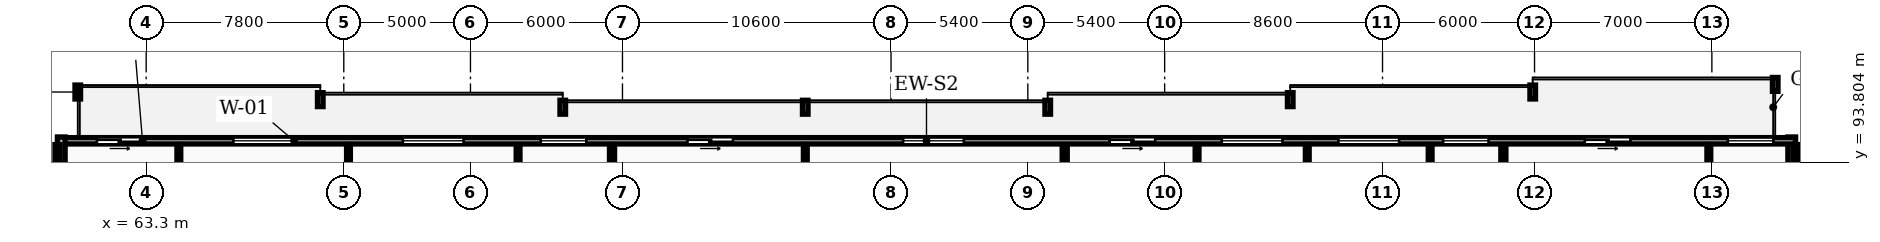
"""IFC4 building model, lengths in metres.
Left out: names, types, materials, properties, quantities, classifications, styles, units other than length and angle.
Written with IfcOpenShell. Run it as: python <this file> out.ifc"""

import sys

from ifc_helpers import new_model, si_unit, direction, frame, frame_2d, origin, place, context, subcontext, project, spatial, rectangle, extrude, element, fill, save


model = new_model("IFC4")
c1 = context("Model", 3, precision=1e-05, world=origin(), true_north=direction((0.0, 1.0)))
c2 = subcontext(c1, "Body", "Model", "MODEL_VIEW")
j1 = project(units=[si_unit("LENGTHUNIT", "METRE"), si_unit("PLANEANGLEUNIT", "RADIAN")], contexts=[c1])
p1 = place(None, origin())
s1 = spatial("IfcSite", under=j1, at=p1, CompositionType="ELEMENT")
p2 = place(p1, origin())
s2 = spatial("IfcBuilding", under=s1, at=p2, CompositionType="ELEMENT")
p3 = place(p2, frame((0.0, 0.0, 228.65)))
s3 = spatial("IfcBuildingStorey", under=s2, at=p3, CompositionType="ELEMENT", Elevation=228.65)
p4 = place(p3, frame((128.25, 91.2, 0.0), z_axis=(0.0, 0.0, 1.0), x_axis=(0.0, 1.0, 0.0)))
e1 = element("IfcWall", 1, at=p4, inside=s3, PredefinedType="STANDARD", context=c2, shape_type="SweptSolid", body=[
    extrude(rectangle(XDim=3.6, YDim=0.3, at=frame_2d((1.8, 0.0))), origin(), (0.0, 0.0, 1.0), 3.17),
])
p5 = place(p3, frame((128.4, 94.65, 0.0), z_axis=(0.0, 0.0, 1.0), x_axis=(-1.0, 0.0, 0.0)))
e2 = element("IfcWall", 2, at=p5, inside=s3, PredefinedType="STANDARD", context=c2, shape_type="SweptSolid", body=[
    extrude(rectangle(XDim=68.6, YDim=0.25, at=frame_2d((34.3, 0.0))), origin(), (0.0, 0.0, 1.0), 3.17),
])
p6 = place(p5, frame((59.262, 0.0, 0.85)))
e3 = element("IfcOpeningElement", 3, at=p6, cuts=e2, PredefinedType="OPENING", context=c2, shape_type="SweptSolid", body=[
    extrude(rectangle(XDim=2.4, YDim=1.9, at=frame_2d((1.2, 0.95))), frame((0.0, 0.135, 0.0), z_axis=(0.0, -1.0, 0.0), x_axis=(1.0, 0.0, 0.0)), (0.0, 0.0, 1.0), 0.27),
])
p7 = place(p5, frame((52.567, 0.0, 0.85)))
e4 = element("IfcOpeningElement", 4, at=p7, cuts=e2, PredefinedType="OPENING", context=c2, shape_type="SweptSolid", body=[
    extrude(rectangle(XDim=2.4, YDim=1.9, at=frame_2d((1.2, 0.95))), frame((0.0, 0.135, 0.0), z_axis=(0.0, -1.0, 0.0), x_axis=(1.0, 0.0, 0.0)), (0.0, 0.0, 1.0), 0.27),
])
p8 = place(p5, frame((65.245, 0.0, 0.0)))
e5 = element("IfcOpeningElement", 5, at=p8, cuts=e2, PredefinedType="OPENING", context=c2, shape_type="SweptSolid", body=[
    extrude(rectangle(XDim=1.8, YDim=2.2, at=frame_2d((0.9, 1.1))), frame((0.0, 0.135, 0.0), z_axis=(0.0, -1.0, 0.0), x_axis=(1.0, 0.0, 0.0)), (0.0, 0.0, 1.0), 0.27),
])
p9 = place(p5, frame((47.726, 0.0, 0.85)))
e6 = element("IfcOpeningElement", 6, at=p9, cuts=e2, PredefinedType="OPENING", context=c2, shape_type="SweptSolid", body=[
    extrude(rectangle(XDim=1.8, YDim=1.8, at=frame_2d((0.9, 0.9))), frame((0.0, 0.135, 0.0), z_axis=(0.0, -1.0, 0.0), x_axis=(1.0, 0.0, 0.0)), (0.0, 0.0, 1.0), 0.27),
])
p10 = place(p5, frame((41.938, 0.0, 0.0)))
e7 = element("IfcOpeningElement", 7, at=p10, cuts=e2, PredefinedType="OPENING", context=c2, shape_type="SweptSolid", body=[
    extrude(rectangle(XDim=1.8, YDim=2.2, at=frame_2d((0.9, 1.1))), frame((0.0, 0.135, 0.0), z_axis=(0.0, -1.0, 0.0), x_axis=(1.0, 0.0, 0.0)), (0.0, 0.0, 1.0), 0.27),
])
p11 = place(p5, frame((32.824, 0.0, 0.85)))
e8 = element("IfcOpeningElement", 8, at=p11, cuts=e2, PredefinedType="OPENING", context=c2, shape_type="SweptSolid", body=[
    extrude(rectangle(XDim=2.4, YDim=1.9, at=frame_2d((1.2, 0.95))), frame((0.0, 0.135, 0.0), z_axis=(0.0, -1.0, 0.0), x_axis=(1.0, 0.0, 0.0)), (0.0, 0.0, 1.0), 0.27),
])
p12 = place(p5, frame((20.245, 0.0, 0.85)))
e9 = element("IfcOpeningElement", 9, at=p12, cuts=e2, PredefinedType="OPENING", context=c2, shape_type="SweptSolid", body=[
    extrude(rectangle(XDim=2.4, YDim=1.9, at=frame_2d((1.2, 0.95))), frame((0.0, 0.135, 0.0), z_axis=(0.0, -1.0, 0.0), x_axis=(1.0, 0.0, 0.0)), (0.0, 0.0, 1.0), 0.27),
])
p13 = place(p5, frame((15.645, 0.0, 0.85)))
e10 = element("IfcOpeningElement", 10, at=p13, cuts=e2, PredefinedType="OPENING", context=c2, shape_type="SweptSolid", body=[
    extrude(rectangle(XDim=2.4, YDim=1.9, at=frame_2d((1.2, 0.95))), frame((0.0, 0.135, 0.0), z_axis=(0.0, -1.0, 0.0), x_axis=(1.0, 0.0, 0.0)), (0.0, 0.0, 1.0), 0.27),
])
p14 = place(p5, frame((25.272, 0.0, 0.0)))
e11 = element("IfcOpeningElement", 11, at=p14, cuts=e2, PredefinedType="OPENING", context=c2, shape_type="SweptSolid", body=[
    extrude(rectangle(XDim=1.8, YDim=2.2, at=frame_2d((0.9, 1.1))), frame((0.0, 0.135, 0.0), z_axis=(0.0, -1.0, 0.0), x_axis=(1.0, 0.0, 0.0)), (0.0, 0.0, 1.0), 0.27),
])
p15 = place(p5, frame((12.11, 0.0, 0.85)))
e12 = element("IfcOpeningElement", 12, at=p15, cuts=e2, PredefinedType="OPENING", context=c2, shape_type="SweptSolid", body=[
    extrude(rectangle(XDim=1.8, YDim=1.8, at=frame_2d((0.9, 0.9))), frame((0.0, 0.135, 0.0), z_axis=(0.0, -1.0, 0.0), x_axis=(1.0, 0.0, 0.0)), (0.0, 0.0, 1.0), 0.27),
])
p16 = place(p5, frame((6.515, 0.0, 0.0)))
e13 = element("IfcOpeningElement", 13, at=p16, cuts=e2, PredefinedType="OPENING", context=c2, shape_type="SweptSolid", body=[
    extrude(rectangle(XDim=1.8, YDim=2.2, at=frame_2d((0.9, 1.1))), frame((0.0, 0.135, 0.0), z_axis=(0.0, -1.0, 0.0), x_axis=(1.0, 0.0, 0.0)), (0.0, 0.0, 1.0), 0.27),
])
p17 = place(p5, frame((0.87, 0.0, 0.85)))
e14 = element("IfcOpeningElement", 14, at=p17, cuts=e2, PredefinedType="OPENING", context=c2, shape_type="SweptSolid", body=[
    extrude(rectangle(XDim=1.8, YDim=1.8, at=frame_2d((0.9, 0.9))), frame((0.0, 0.135, 0.0), z_axis=(0.0, -1.0, 0.0), x_axis=(1.0, 0.0, 0.0)), (0.0, 0.0, 1.0), 0.27),
])
p18 = place(p3, frame((59.95, 94.8, 0.0), z_axis=(0.0, 0.0, 1.0), x_axis=(0.0, -1.0, 0.0)))
e15 = element("IfcWall", 15, at=p18, inside=s3, PredefinedType="STANDARD", context=c2, shape_type="SweptSolid", body=[
    extrude(rectangle(XDim=3.6, YDim=0.3, at=frame_2d((1.8, 0.0))), origin(), (0.0, 0.0, 1.0), 3.17),
])
for number, where, z_axis, x_axis in (
    (16, (59.8, 70.18, 0.0), (0.0, 0.0, 1.0), (0.0, 1.0, 0.0)),
    (17, (128.4, 70.18, 0.0), (0.0, 0.0, 1.0), (0.0, 1.0, 0.0)),
):
    element("IfcWall", number, at=place(p3, frame(where, z_axis=z_axis, x_axis=x_axis)), inside=s3, PredefinedType="PARTITIONING", context=c2, shape_type="SweptSolid", body=[
        extrude(rectangle(XDim=24.32, YDim=0.2, at=frame_2d((12.16, 0.0))), origin(), (0.0, 0.0, 1.0), 2.477),
    ])
p19 = place(p3, frame((81.687, 70.18, 0.0), z_axis=(0.0, 0.0, 1.0), x_axis=(0.0, 1.0, 0.0)))
e18 = element("IfcWall", 18, at=p19, inside=s3, PredefinedType="PARTITIONING", context=c2, shape_type="SweptSolid", body=[
    extrude(rectangle(XDim=24.32, YDim=0.2, at=frame_2d((12.16, 0.0))), origin(), (0.0, 0.0, 1.0), 3.17),
])
p20 = place(p3, frame((71.285, 89.33, 0.0), z_axis=(0.0, 0.0, 1.0), x_axis=(0.0, 1.0, 0.0)))
e19 = element("IfcWall", 19, at=p20, inside=s3, PredefinedType="PARTITIONING", context=c2, shape_type="SweptSolid", body=[
    extrude(rectangle(XDim=5.17, YDim=0.15, at=frame_2d((2.585, 0.0))), origin(), (0.0, 0.0, 1.0), 3.17),
])
p21 = place(p3, frame((64.59, 84.19, 0.0), z_axis=(0.0, 0.0, 1.0), x_axis=(0.0, 1.0, 0.0)))
e20 = element("IfcWall", 20, at=p21, inside=s3, PredefinedType="PARTITIONING", context=c2, shape_type="SweptSolid", body=[
    extrude(rectangle(XDim=10.31, YDim=0.15, at=frame_2d((5.155, 0.0))), origin(), (0.0, 0.0, 1.0), 3.17),
])
p22 = place(p21, frame((3.82, 0.0, 0.0)))
e21 = element("IfcOpeningElement", 21, at=p22, cuts=e20, PredefinedType="OPENING", context=c2, shape_type="SweptSolid", body=[
    extrude(rectangle(XDim=0.92, YDim=2.08, at=frame_2d((0.46, 1.04))), frame((0.0, 0.085, 0.0), z_axis=(0.0, -1.0, 0.0), x_axis=(1.0, 0.0, 0.0)), (0.0, 0.0, 1.0), 0.17),
])
p23 = place(p3, frame((77.98, 86.81, 0.0), z_axis=(0.0, 0.0, 1.0), x_axis=(0.0, 1.0, 0.0)))
e22 = element("IfcWall", 22, at=p23, inside=s3, PredefinedType="PARTITIONING", context=c2, shape_type="SweptSolid", body=[
    extrude(rectangle(XDim=7.69, YDim=0.15, at=frame_2d((3.845, 0.0))), origin(), (0.0, 0.0, 1.0), 3.17),
])
p24 = place(p23, frame((1.2, 0.0, 0.0)))
e23 = element("IfcOpeningElement", 23, at=p24, cuts=e22, PredefinedType="OPENING", context=c2, shape_type="SweptSolid", body=[
    extrude(rectangle(XDim=0.92, YDim=2.08, at=frame_2d((0.46, 1.04))), frame((0.0, 0.085, 0.0), z_axis=(0.0, -1.0, 0.0), x_axis=(1.0, 0.0, 0.0)), (0.0, 0.0, 1.0), 0.17),
])
p25 = place(p3, frame((99.556, 70.18, 0.0), z_axis=(0.0, 0.0, 1.0), x_axis=(0.0, 1.0, 0.0)))
e24 = element("IfcWall", 24, at=p25, inside=s3, PredefinedType="PARTITIONING", context=c2, shape_type="SweptSolid", body=[
    extrude(rectangle(XDim=24.32, YDim=0.2, at=frame_2d((12.16, 0.0))), origin(), (0.0, 0.0, 1.0), 3.17),
])
p26 = place(p3, frame((89.316, 89.33, 0.0), z_axis=(0.0, 0.0, 1.0), x_axis=(0.0, 1.0, 0.0)))
e25 = element("IfcWall", 25, at=p26, inside=s3, PredefinedType="PARTITIONING", context=c2, shape_type="SweptSolid", body=[
    extrude(rectangle(XDim=5.17, YDim=0.15, at=frame_2d((2.585, 0.0))), origin(), (0.0, 0.0, 1.0), 3.17),
])
p27 = place(p3, frame((116.87, 70.18, 0.0), z_axis=(0.0, 0.0, 1.0), x_axis=(0.0, 1.0, 0.0)))
e26 = element("IfcWall", 26, at=p27, inside=s3, PredefinedType="PARTITIONING", context=c2, shape_type="SweptSolid", body=[
    extrude(rectangle(XDim=24.32, YDim=0.2, at=frame_2d((12.16, 0.0))), origin(), (0.0, 0.0, 1.0), 3.17),
])
p28 = place(p3, frame((109.13, 89.33, 0.0), z_axis=(0.0, 0.0, 1.0), x_axis=(0.0, 1.0, 0.0)))
e27 = element("IfcWall", 27, at=p28, inside=s3, PredefinedType="PARTITIONING", context=c2, shape_type="SweptSolid", body=[
    extrude(rectangle(XDim=5.17, YDim=0.15, at=frame_2d((2.585, 0.0))), origin(), (0.0, 0.0, 1.0), 3.17),
])
p29 = place(p3, frame((104.78, 84.19, 0.0), z_axis=(0.0, 0.0, 1.0), x_axis=(0.0, 1.0, 0.0)))
e28 = element("IfcWall", 28, at=p29, inside=s3, PredefinedType="PARTITIONING", context=c2, shape_type="SweptSolid", body=[
    extrude(rectangle(XDim=10.31, YDim=0.15, at=frame_2d((5.155, 0.0))), origin(), (0.0, 0.0, 1.0), 3.17),
])
p30 = place(p29, frame((3.82, 0.0, 0.0)))
e29 = element("IfcOpeningElement", 29, at=p30, cuts=e28, PredefinedType="OPENING", context=c2, shape_type="SweptSolid", body=[
    extrude(rectangle(XDim=0.92, YDim=2.08, at=frame_2d((0.46, 1.04))), frame((0.0, 0.085, 0.0), z_axis=(0.0, -1.0, 0.0), x_axis=(1.0, 0.0, 0.0)), (0.0, 0.0, 1.0), 0.17),
])
p31 = place(p3, frame((113.98, 86.92, 0.0), z_axis=(0.0, 0.0, 1.0), x_axis=(0.0, 1.0, 0.0)))
e30 = element("IfcWall", 30, at=p31, inside=s3, PredefinedType="PARTITIONING", context=c2, shape_type="SweptSolid", body=[
    extrude(rectangle(XDim=7.58, YDim=0.15, at=frame_2d((3.79, 0.0))), origin(), (0.0, 0.0, 1.0), 3.17),
])
p32 = place(p31, frame((1.09, 0.0, 0.0)))
e31 = element("IfcOpeningElement", 31, at=p32, cuts=e30, PredefinedType="OPENING", context=c2, shape_type="SweptSolid", body=[
    extrude(rectangle(XDim=0.92, YDim=2.08, at=frame_2d((0.46, 1.04))), frame((0.0, 0.085, 0.0), z_axis=(0.0, -1.0, 0.0), x_axis=(1.0, 0.0, 0.0)), (0.0, 0.0, 1.0), 0.17),
])
p33 = place(p3, frame((124.98, 84.19, 0.0), z_axis=(0.0, 0.0, 1.0), x_axis=(0.0, 1.0, 0.0)))
e32 = element("IfcWall", 32, at=p33, inside=s3, PredefinedType="PARTITIONING", context=c2, shape_type="SweptSolid", body=[
    extrude(rectangle(XDim=10.31, YDim=0.15, at=frame_2d((5.155, 0.0))), origin(), (0.0, 0.0, 1.0), 3.17),
])
p34 = place(p33, frame((1.43, 0.0, 0.0)))
e33 = element("IfcOpeningElement", 33, at=p34, cuts=e32, PredefinedType="OPENING", context=c2, shape_type="SweptSolid", body=[
    extrude(rectangle(XDim=0.84, YDim=2.04, at=frame_2d((0.42, 1.02))), frame((0.0, 0.085, 0.0), z_axis=(0.0, -1.0, 0.0), x_axis=(1.0, 0.0, 0.0)), (0.0, 0.0, 1.0), 0.17),
])
p35 = place(p33, frame((3.92, 0.0, 0.0)))
e34 = element("IfcOpeningElement", 34, at=p35, cuts=e32, PredefinedType="OPENING", context=c2, shape_type="SweptSolid", body=[
    extrude(rectangle(XDim=0.84, YDim=2.04, at=frame_2d((0.42, 1.02))), frame((0.0, 0.085, 0.0), z_axis=(0.0, -1.0, 0.0), x_axis=(1.0, 0.0, 0.0)), (0.0, 0.0, 1.0), 0.17),
])
p36 = place(p33, frame((5.48, 0.0, 0.0)))
e35 = element("IfcOpeningElement", 35, at=p36, cuts=e32, PredefinedType="OPENING", context=c2, shape_type="SweptSolid", body=[
    extrude(rectangle(XDim=0.88, YDim=2.06, at=frame_2d((0.44, 1.03))), frame((0.0, 0.085, 0.0), z_axis=(0.0, -1.0, 0.0), x_axis=(1.0, 0.0, 0.0)), (0.0, 0.0, 1.0), 0.17),
])
p37 = place(p6, origin())
e36 = element("IfcWindow", 36, at=p37, inside=s3, PartitioningType="DOUBLE_PANEL_VERTICAL", PredefinedType="WINDOW", context=c2, shape_type="SweptSolid", body=[
    extrude(rectangle(XDim=2.4, YDim=1.9, at=frame_2d((1.2, 0.95))), frame((0.0, 0.03, 0.0), z_axis=(0.0, -1.0, 0.0), x_axis=(1.0, 0.0, 0.0)), (0.0, 0.0, 1.0), 0.06),
])
fill(e3, e36)
p38 = place(p7, origin())
e37 = element("IfcWindow", 37, at=p38, inside=s3, PartitioningType="DOUBLE_PANEL_VERTICAL", PredefinedType="WINDOW", context=c2, shape_type="SweptSolid", body=[
    extrude(rectangle(XDim=2.4, YDim=1.9, at=frame_2d((1.2, 0.95))), frame((0.0, 0.03, 0.0), z_axis=(0.0, -1.0, 0.0), x_axis=(1.0, 0.0, 0.0)), (0.0, 0.0, 1.0), 0.06),
])
fill(e4, e37)
p39 = place(p8, origin())
e38 = element("IfcDoor", 38, at=p39, inside=s3, OperationType="SLIDING_TO_LEFT", PredefinedType="DOOR", context=c2, shape_type="SweptSolid", body=[
    extrude(rectangle(XDim=1.8, YDim=2.2, at=frame_2d((0.9, 1.1))), frame((0.0, 0.025, 0.0), z_axis=(0.0, -1.0, 0.0), x_axis=(1.0, 0.0, 0.0)), (0.0, 0.0, 1.0), 0.05),
])
fill(e5, e38)
p40 = place(p9, origin())
e39 = element("IfcWindow", 39, at=p40, inside=s3, PartitioningType="SINGLE_PANEL", PredefinedType="WINDOW", context=c2, shape_type="SweptSolid", body=[
    extrude(rectangle(XDim=1.8, YDim=1.8, at=frame_2d((0.9, 0.9))), frame((0.0, 0.03, 0.0), z_axis=(0.0, -1.0, 0.0), x_axis=(1.0, 0.0, 0.0)), (0.0, 0.0, 1.0), 0.06),
])
fill(e6, e39)
p41 = place(p10, origin())
e40 = element("IfcDoor", 40, at=p41, inside=s3, OperationType="SLIDING_TO_LEFT", PredefinedType="DOOR", context=c2, shape_type="SweptSolid", body=[
    extrude(rectangle(XDim=1.8, YDim=2.2, at=frame_2d((0.9, 1.1))), frame((0.0, 0.025, 0.0), z_axis=(0.0, -1.0, 0.0), x_axis=(1.0, 0.0, 0.0)), (0.0, 0.0, 1.0), 0.05),
])
fill(e7, e40)
p42 = place(p11, origin())
e41 = element("IfcWindow", 41, at=p42, inside=s3, PartitioningType="DOUBLE_PANEL_VERTICAL", PredefinedType="WINDOW", context=c2, shape_type="SweptSolid", body=[
    extrude(rectangle(XDim=2.4, YDim=1.9, at=frame_2d((1.2, 0.95))), frame((0.0, 0.03, 0.0), z_axis=(0.0, -1.0, 0.0), x_axis=(1.0, 0.0, 0.0)), (0.0, 0.0, 1.0), 0.06),
])
fill(e8, e41)
p43 = place(p12, origin())
e42 = element("IfcWindow", 42, at=p43, inside=s3, PartitioningType="DOUBLE_PANEL_VERTICAL", PredefinedType="WINDOW", context=c2, shape_type="SweptSolid", body=[
    extrude(rectangle(XDim=2.4, YDim=1.9, at=frame_2d((1.2, 0.95))), frame((0.0, 0.03, 0.0), z_axis=(0.0, -1.0, 0.0), x_axis=(1.0, 0.0, 0.0)), (0.0, 0.0, 1.0), 0.06),
])
fill(e9, e42)
p44 = place(p13, origin())
e43 = element("IfcWindow", 43, at=p44, inside=s3, PartitioningType="DOUBLE_PANEL_VERTICAL", PredefinedType="WINDOW", context=c2, shape_type="SweptSolid", body=[
    extrude(rectangle(XDim=2.4, YDim=1.9, at=frame_2d((1.2, 0.95))), frame((0.0, 0.03, 0.0), z_axis=(0.0, -1.0, 0.0), x_axis=(1.0, 0.0, 0.0)), (0.0, 0.0, 1.0), 0.06),
])
fill(e10, e43)
p45 = place(p14, origin())
e44 = element("IfcDoor", 44, at=p45, inside=s3, OperationType="SLIDING_TO_LEFT", PredefinedType="DOOR", context=c2, shape_type="SweptSolid", body=[
    extrude(rectangle(XDim=1.8, YDim=2.2, at=frame_2d((0.9, 1.1))), frame((0.0, 0.025, 0.0), z_axis=(0.0, -1.0, 0.0), x_axis=(1.0, 0.0, 0.0)), (0.0, 0.0, 1.0), 0.05),
])
fill(e11, e44)
p46 = place(p15, origin())
e45 = element("IfcWindow", 45, at=p46, inside=s3, PartitioningType="SINGLE_PANEL", PredefinedType="WINDOW", context=c2, shape_type="SweptSolid", body=[
    extrude(rectangle(XDim=1.8, YDim=1.8, at=frame_2d((0.9, 0.9))), frame((0.0, 0.03, 0.0), z_axis=(0.0, -1.0, 0.0), x_axis=(1.0, 0.0, 0.0)), (0.0, 0.0, 1.0), 0.06),
])
fill(e12, e45)
p47 = place(p16, origin())
e46 = element("IfcDoor", 46, at=p47, inside=s3, OperationType="SLIDING_TO_LEFT", PredefinedType="DOOR", context=c2, shape_type="SweptSolid", body=[
    extrude(rectangle(XDim=1.8, YDim=2.2, at=frame_2d((0.9, 1.1))), frame((0.0, 0.025, 0.0), z_axis=(0.0, -1.0, 0.0), x_axis=(1.0, 0.0, 0.0)), (0.0, 0.0, 1.0), 0.05),
])
fill(e13, e46)
p48 = place(p17, origin())
e47 = element("IfcWindow", 47, at=p48, inside=s3, PartitioningType="SINGLE_PANEL", PredefinedType="WINDOW", context=c2, shape_type="SweptSolid", body=[
    extrude(rectangle(XDim=1.8, YDim=1.8, at=frame_2d((0.9, 0.9))), frame((0.0, 0.03, 0.0), z_axis=(0.0, -1.0, 0.0), x_axis=(1.0, 0.0, 0.0)), (0.0, 0.0, 1.0), 0.06),
])
fill(e14, e47)
save(model, sys.argv[1])
